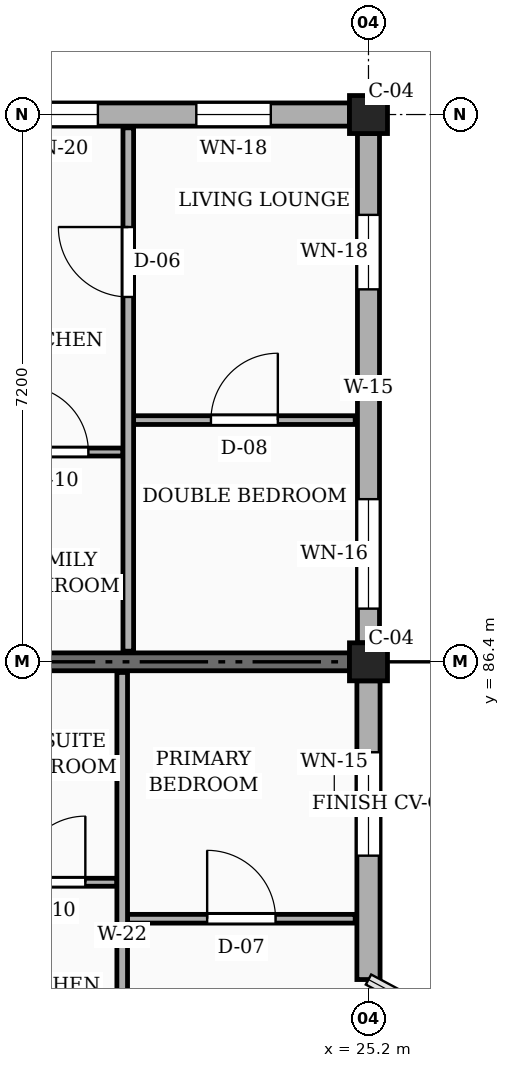
"""IFC4 building model, lengths in metres.
Left out: names, types, materials, properties, quantities, classifications, styles, units other than length and angle.
Written with IfcOpenShell. Run it as: python <this file> out.ifc"""

import sys

from ifc_helpers import new_model, si_unit, direction, frame, frame_2d, origin, origin_2d, place, context, subcontext, project, spatial, rectangle, extrude, element, fill, save


model = new_model("IFC4")
c1 = context("Model", 3, precision=1e-05, world=origin(), true_north=direction((0.0, 1.0)))
c2 = subcontext(c1, "Body", "Model", "MODEL_VIEW")
j1 = project(units=[si_unit("LENGTHUNIT", "METRE"), si_unit("PLANEANGLEUNIT", "RADIAN")], contexts=[c1])
p1 = place(None, origin())
s1 = spatial("IfcSite", under=j1, at=p1, CompositionType="ELEMENT")
p2 = place(p1, origin())
s2 = spatial("IfcBuilding", under=s1, at=p2, CompositionType="ELEMENT")
p3 = place(p2, frame((0.0, 0.0, 23.4)))
s3 = spatial("IfcBuildingStorey", under=s2, at=p3, CompositionType="ELEMENT", Elevation=23.4)
for number, where, z_axis, x_axis in (
    (1, (25.2, 86.4, 0.0), (0.0, 0.0, 1.0), (1.0, 0.0, 0.0)),
    (2, (25.2, 93.6, 0.0), (0.0, 0.0, 1.0), (1.0, 0.0, 0.0)),
):
    element("IfcColumn", number, at=place(p3, frame(where, z_axis=z_axis, x_axis=x_axis)), inside=s3, PredefinedType="COLUMN", context=c2, shape_type="SweptSolid", body=[
        extrude(rectangle(XDim=0.5, YDim=0.5, at=origin_2d()), origin(), (0.0, 0.0, 1.0), 3.15),
    ])
p4 = place(p3, frame((20.1, 86.4, 0.0), z_axis=(0.0, 0.0, 1.0), x_axis=(1.0, 0.0, 0.0)))
e3 = element("IfcWall", 3, at=p4, inside=s3, PredefinedType="SOLIDWALL", context=c2, shape_type="SweptSolid", body=[
    extrude(rectangle(XDim=4.85, YDim=0.235, at=frame_2d((2.425, 0.0))), origin(), (0.0, 0.0, 1.0), 2.21),
])
p5 = place(p3, frame((25.2, 82.22, 0.0), z_axis=(0.0, 0.0, 1.0), x_axis=(0.0, 1.0, 0.0)))
e4 = element("IfcWall", 4, at=p5, inside=s3, PredefinedType="SOLIDWALL", context=c2, shape_type="SweptSolid", body=[
    extrude(rectangle(XDim=3.93, YDim=0.305, at=frame_2d((1.965, 0.0))), origin(), (0.0, 0.0, 1.0), 2.48),
])
p6 = place(p5, frame((1.63, 0.0, 0.78)))
e5 = element("IfcOpeningElement", 5, at=p6, cuts=e4, PredefinedType="OPENING", context=c2, shape_type="SweptSolid", body=[
    extrude(rectangle(XDim=1.36, YDim=1.26, at=frame_2d((0.68, 0.63))), frame((0.0, 0.163, 0.0), z_axis=(0.0, -1.0, 0.0), x_axis=(1.0, 0.0, 0.0)), (0.0, 0.0, 1.0), 0.325),
])
p7 = place(p3, frame((25.2, 86.65, 0.0), z_axis=(0.0, 0.0, 1.0), x_axis=(0.0, 1.0, 0.0)))
e6 = element("IfcWall", 6, at=p7, inside=s3, PredefinedType="SOLIDWALL", context=c2, shape_type="SweptSolid", body=[
    extrude(rectangle(XDim=6.7, YDim=0.29, at=frame_2d((3.35, 0.0))), origin(), (0.0, 0.0, 1.0), 2.48),
])
p8 = place(p7, frame((0.45, 0.0, 0.78)))
e7 = element("IfcOpeningElement", 7, at=p8, cuts=e6, PredefinedType="OPENING", context=c2, shape_type="SweptSolid", body=[
    extrude(rectangle(XDim=1.44, YDim=1.26, at=frame_2d((0.72, 0.63))), frame((0.0, 0.155, 0.0), z_axis=(0.0, -1.0, 0.0), x_axis=(1.0, 0.0, 0.0)), (0.0, 0.0, 1.0), 0.31),
])
p9 = place(p7, frame((4.65, 0.0, 0.78)))
e8 = element("IfcOpeningElement", 8, at=p9, cuts=e6, PredefinedType="OPENING", context=c2, shape_type="SweptSolid", body=[
    extrude(rectangle(XDim=0.98, YDim=1.36, at=frame_2d((0.49, 0.68))), frame((0.0, 0.155, 0.0), z_axis=(0.0, -1.0, 0.0), x_axis=(1.0, 0.0, 0.0)), (0.0, 0.0, 1.0), 0.31),
])
p10 = place(p3, frame((24.95, 93.6, 0.0), z_axis=(0.0, 0.0, 1.0), x_axis=(-1.0, 0.0, 0.0)))
e9 = element("IfcWall", 9, at=p10, inside=s3, PredefinedType="SOLIDWALL", context=c2, shape_type="SweptSolid", body=[
    extrude(rectangle(XDim=6.7, YDim=0.305, at=frame_2d((3.35, 0.0))), origin(), (0.0, 0.0, 1.0), 2.48),
])
p11 = place(p10, frame((1.035, 0.0, 0.78)))
e10 = element("IfcOpeningElement", 10, at=p11, cuts=e9, PredefinedType="OPENING", context=c2, shape_type="SweptSolid", body=[
    extrude(rectangle(XDim=0.98, YDim=1.36, at=frame_2d((0.49, 0.68))), frame((0.0, 0.163, 0.0), z_axis=(0.0, -1.0, 0.0), x_axis=(1.0, 0.0, 0.0)), (0.0, 0.0, 1.0), 0.325),
])
p12 = place(p10, frame((3.31, 0.0, 0.78)))
e11 = element("IfcOpeningElement", 11, at=p12, cuts=e9, PredefinedType="OPENING", context=c2, shape_type="SweptSolid", body=[
    extrude(rectangle(XDim=1.14, YDim=1.36, at=frame_2d((0.57, 0.68))), frame((0.0, 0.163, 0.0), z_axis=(0.0, -1.0, 0.0), x_axis=(1.0, 0.0, 0.0)), (0.0, 0.0, 1.0), 0.325),
])
p13 = place(p10, frame((5.185, 0.0, 0.78)))
e12 = element("IfcOpeningElement", 12, at=p13, cuts=e9, PredefinedType="OPENING", context=c2, shape_type="SweptSolid", body=[
    extrude(rectangle(XDim=1.04, YDim=1.26, at=frame_2d((0.52, 0.63))), frame((0.0, 0.163, 0.0), z_axis=(0.0, -1.0, 0.0), x_axis=(1.0, 0.0, 0.0)), (0.0, 0.0, 1.0), 0.325),
])
p14 = place(p3, frame((22.03, 83.02, 0.0), z_axis=(0.0, 0.0, 1.0), x_axis=(1.0, 0.0, 0.0)))
e13 = element("IfcWall", 13, at=p14, inside=s3, PredefinedType="PARTITIONING", context=c2, shape_type="SweptSolid", body=[
    extrude(rectangle(XDim=2.995, YDim=0.115, at=frame_2d((1.498, 0.0))), origin(), (0.0, 0.0, 1.0), 2.345),
])
p15 = place(p14, frame((1.048, 0.0, 0.0)))
e14 = element("IfcOpeningElement", 14, at=p15, cuts=e13, PredefinedType="OPENING", context=c2, shape_type="SweptSolid", body=[
    extrude(rectangle(XDim=0.9, YDim=2.1, at=frame_2d((0.45, 1.05))), frame((0.0, 0.067, 0.0), z_axis=(0.0, -1.0, 0.0), x_axis=(1.0, 0.0, 0.0)), (0.0, 0.0, 1.0), 0.135),
])
p16 = place(p3, frame((20.19, 83.5, 0.0), z_axis=(0.0, 0.0, 1.0), x_axis=(1.0, 0.0, 0.0)))
e15 = element("IfcWall", 15, at=p16, inside=s3, PredefinedType="PARTITIONING", context=c2, shape_type="SweptSolid", body=[
    extrude(rectangle(XDim=1.7, YDim=0.105, at=frame_2d((0.85, 0.0))), origin(), (0.0, 0.0, 1.0), 2.345),
])
p17 = place(p16, frame((0.415, 0.0, 0.0)))
e16 = element("IfcOpeningElement", 16, at=p17, cuts=e15, PredefinedType="OPENING", context=c2, shape_type="SweptSolid", body=[
    extrude(rectangle(XDim=0.87, YDim=2.05, at=frame_2d((0.435, 1.025))), frame((0.0, 0.062, 0.0), z_axis=(0.0, -1.0, 0.0), x_axis=(1.0, 0.0, 0.0)), (0.0, 0.0, 1.0), 0.125),
])
p18 = place(p3, frame((21.96, 79.34, 0.0), z_axis=(0.0, 0.0, 1.0), x_axis=(0.0, 1.0, 0.0)))
e17 = element("IfcWall", 17, at=p18, inside=s3, PredefinedType="PARTITIONING", context=c2, shape_type="SweptSolid", body=[
    extrude(rectangle(XDim=6.92, YDim=0.14, at=frame_2d((3.46, 0.0))), origin(), (0.0, 0.0, 1.0), 2.345),
])
p19 = place(p18, frame((1.31, 0.0, 0.0)))
e18 = element("IfcOpeningElement", 18, at=p19, cuts=e17, PredefinedType="OPENING", context=c2, shape_type="SweptSolid", body=[
    extrude(rectangle(XDim=0.95, YDim=2.1, at=frame_2d((0.475, 1.05))), frame((0.0, 0.08, 0.0), z_axis=(0.0, -1.0, 0.0), x_axis=(1.0, 0.0, 0.0)), (0.0, 0.0, 1.0), 0.16),
])
p20 = place(p3, frame((22.11, 89.58, 0.0), z_axis=(0.0, 0.0, 1.0), x_axis=(1.0, 0.0, 0.0)))
e19 = element("IfcWall", 19, at=p20, inside=s3, PredefinedType="PARTITIONING", context=c2, shape_type="SweptSolid", body=[
    extrude(rectangle(XDim=2.915, YDim=0.115, at=frame_2d((1.458, 0.0))), origin(), (0.0, 0.0, 1.0), 2.345),
])
p21 = place(p20, frame((1.018, 0.0, 0.0)))
e20 = element("IfcOpeningElement", 20, at=p21, cuts=e19, PredefinedType="OPENING", context=c2, shape_type="SweptSolid", body=[
    extrude(rectangle(XDim=0.88, YDim=2.08, at=frame_2d((0.44, 1.04))), frame((0.0, 0.067, 0.0), z_axis=(0.0, -1.0, 0.0), x_axis=(1.0, 0.0, 0.0)), (0.0, 0.0, 1.0), 0.135),
])
p22 = place(p3, frame((20.19, 89.16, 0.0), z_axis=(0.0, 0.0, 1.0), x_axis=(1.0, 0.0, 0.0)))
e21 = element("IfcWall", 21, at=p22, inside=s3, PredefinedType="PARTITIONING", context=c2, shape_type="SweptSolid", body=[
    extrude(rectangle(XDim=1.78, YDim=0.105, at=frame_2d((0.89, 0.0))), origin(), (0.0, 0.0, 1.0), 2.345),
])
p23 = place(p22, frame((0.455, 0.0, 0.0)))
e22 = element("IfcOpeningElement", 22, at=p23, cuts=e21, PredefinedType="OPENING", context=c2, shape_type="SweptSolid", body=[
    extrude(rectangle(XDim=0.87, YDim=2.05, at=frame_2d((0.435, 1.025))), frame((0.0, 0.062, 0.0), z_axis=(0.0, -1.0, 0.0), x_axis=(1.0, 0.0, 0.0)), (0.0, 0.0, 1.0), 0.125),
])
p24 = place(p3, frame((22.04, 86.54, 0.0), z_axis=(0.0, 0.0, 1.0), x_axis=(0.0, 1.0, 0.0)))
e23 = element("IfcWall", 23, at=p24, inside=s3, PredefinedType="PARTITIONING", context=c2, shape_type="SweptSolid", body=[
    extrude(rectangle(XDim=6.885, YDim=0.14, at=frame_2d((3.442, 0.0))), origin(), (0.0, 0.0, 1.0), 2.345),
])
p25 = place(p24, frame((4.66, 0.0, 0.0)))
e24 = element("IfcOpeningElement", 24, at=p25, cuts=e23, PredefinedType="OPENING", context=c2, shape_type="SweptSolid", body=[
    extrude(rectangle(XDim=0.92, YDim=2.1, at=frame_2d((0.46, 1.05))), frame((0.0, 0.08, 0.0), z_axis=(0.0, -1.0, 0.0), x_axis=(1.0, 0.0, 0.0)), (0.0, 0.0, 1.0), 0.16),
])
p26 = place(p6, origin())
e25 = element("IfcWindow", 25, at=p26, inside=s3, PartitioningType="SINGLE_PANEL", PredefinedType="WINDOW", context=c2, shape_type="SweptSolid", body=[
    extrude(rectangle(XDim=1.36, YDim=1.26, at=frame_2d((0.68, 0.63))), frame((0.0, 0.03, 0.0), z_axis=(0.0, -1.0, 0.0), x_axis=(1.0, 0.0, 0.0)), (0.0, 0.0, 1.0), 0.06),
])
fill(e5, e25)
p27 = place(p8, origin())
e26 = element("IfcWindow", 26, at=p27, inside=s3, PartitioningType="SINGLE_PANEL", PredefinedType="WINDOW", context=c2, shape_type="SweptSolid", body=[
    extrude(rectangle(XDim=1.44, YDim=1.26, at=frame_2d((0.72, 0.63))), frame((0.0, 0.03, 0.0), z_axis=(0.0, -1.0, 0.0), x_axis=(1.0, 0.0, 0.0)), (0.0, 0.0, 1.0), 0.06),
])
fill(e7, e26)
p28 = place(p9, origin())
e27 = element("IfcWindow", 27, at=p28, inside=s3, PartitioningType="SINGLE_PANEL", PredefinedType="WINDOW", context=c2, shape_type="SweptSolid", body=[
    extrude(rectangle(XDim=0.98, YDim=1.36, at=frame_2d((0.49, 0.68))), frame((0.0, 0.03, 0.0), z_axis=(0.0, -1.0, 0.0), x_axis=(1.0, 0.0, 0.0)), (0.0, 0.0, 1.0), 0.06),
])
fill(e8, e27)
p29 = place(p11, origin())
e28 = element("IfcWindow", 28, at=p29, inside=s3, PartitioningType="SINGLE_PANEL", PredefinedType="WINDOW", context=c2, shape_type="SweptSolid", body=[
    extrude(rectangle(XDim=0.98, YDim=1.36, at=frame_2d((0.49, 0.68))), frame((0.0, 0.03, 0.0), z_axis=(0.0, -1.0, 0.0), x_axis=(1.0, 0.0, 0.0)), (0.0, 0.0, 1.0), 0.06),
])
fill(e10, e28)
p30 = place(p12, origin())
e29 = element("IfcWindow", 29, at=p30, inside=s3, PartitioningType="SINGLE_PANEL", PredefinedType="WINDOW", context=c2, shape_type="SweptSolid", body=[
    extrude(rectangle(XDim=1.14, YDim=1.36, at=frame_2d((0.57, 0.68))), frame((0.0, 0.03, 0.0), z_axis=(0.0, -1.0, 0.0), x_axis=(1.0, 0.0, 0.0)), (0.0, 0.0, 1.0), 0.06),
])
fill(e11, e29)
p31 = place(p15, origin())
e30 = element("IfcDoor", 30, at=p31, inside=s3, OperationType="SINGLE_SWING_LEFT", PredefinedType="DOOR", context=c2, shape_type="SweptSolid", body=[
    extrude(rectangle(XDim=0.9, YDim=2.1, at=frame_2d((0.45, 1.05))), frame((0.0, 0.025, 0.0), z_axis=(0.0, -1.0, 0.0), x_axis=(1.0, 0.0, 0.0)), (0.0, 0.0, 1.0), 0.05),
])
fill(e14, e30)
p32 = place(p17, origin())
e31 = element("IfcDoor", 31, at=p32, inside=s3, OperationType="SINGLE_SWING_RIGHT", PredefinedType="DOOR", context=c2, shape_type="SweptSolid", body=[
    extrude(rectangle(XDim=0.87, YDim=2.05, at=frame_2d((0.435, 1.025))), frame((0.0, 0.025, 0.0), z_axis=(0.0, -1.0, 0.0), x_axis=(1.0, 0.0, 0.0)), (0.0, 0.0, 1.0), 0.05),
])
fill(e16, e31)
p33 = place(p21, origin())
e32 = element("IfcDoor", 32, at=p33, inside=s3, OperationType="SINGLE_SWING_RIGHT", PredefinedType="DOOR", context=c2, shape_type="SweptSolid", body=[
    extrude(rectangle(XDim=0.88, YDim=2.08, at=frame_2d((0.44, 1.04))), frame((0.0, 0.025, 0.0), z_axis=(0.0, -1.0, 0.0), x_axis=(1.0, 0.0, 0.0)), (0.0, 0.0, 1.0), 0.05),
])
fill(e20, e32)
p34 = place(p23, origin())
e33 = element("IfcDoor", 33, at=p34, inside=s3, OperationType="SINGLE_SWING_LEFT", PredefinedType="DOOR", context=c2, shape_type="SweptSolid", body=[
    extrude(rectangle(XDim=0.87, YDim=2.05, at=frame_2d((0.435, 1.025))), frame((0.0, 0.025, 0.0), z_axis=(0.0, -1.0, 0.0), x_axis=(1.0, 0.0, 0.0)), (0.0, 0.0, 1.0), 0.05),
])
fill(e22, e33)
p35 = place(p25, origin())
e34 = element("IfcDoor", 34, at=p35, inside=s3, OperationType="SINGLE_SWING_RIGHT", PredefinedType="DOOR", context=c2, shape_type="SweptSolid", body=[
    extrude(rectangle(XDim=0.92, YDim=2.1, at=frame_2d((0.46, 1.05))), frame((0.0, 0.025, 0.0), z_axis=(0.0, -1.0, 0.0), x_axis=(1.0, 0.0, 0.0)), (0.0, 0.0, 1.0), 0.05),
])
fill(e24, e34)
save(model, sys.argv[1])
